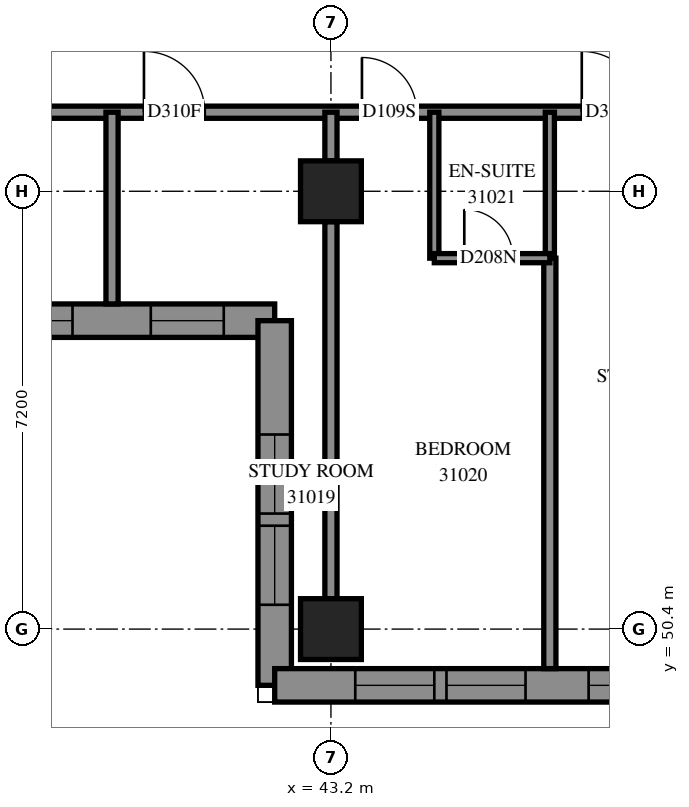
"""IFC4 building model, lengths in metres.
Left out: names, types, materials, properties, quantities, classifications, styles, units other than length and angle.
Written with IfcOpenShell. Run it as: python <this file> out.ifc"""

import sys

from ifc_helpers import new_model, si_unit, direction, frame, frame_2d, origin, origin_2d, place, context, subcontext, project, spatial, polyline, rectangle, outline, extrude, element, fill, save


model = new_model("IFC4")
c1 = context("Model", 3, precision=1e-05, world=origin(), true_north=direction((0.0, 1.0)))
c2 = subcontext(c1, "Body", "Model", "MODEL_VIEW")
j1 = project(units=[si_unit("LENGTHUNIT", "METRE"), si_unit("PLANEANGLEUNIT", "RADIAN")], contexts=[c1])
p1 = place(None, origin())
s1 = spatial("IfcSite", under=j1, at=p1, CompositionType="ELEMENT")
p2 = place(p1, origin())
s2 = spatial("IfcBuilding", under=s1, at=p2, CompositionType="ELEMENT")
p3 = place(p2, frame((0.0, 0.0, 115.2)))
s3 = spatial("IfcBuildingStorey", under=s2, at=p3, CompositionType="ELEMENT", Elevation=115.2)
for number, where, z_axis, x_axis in (
    (1, (43.2, 50.4, 0.0), (0.0, 0.0, 1.0), (1.0, 0.0, 0.0)),
    (2, (43.2, 57.6, 0.0), (0.0, 0.0, 1.0), (1.0, 0.0, 0.0)),
):
    element("IfcColumn", number, at=place(p3, frame(where, z_axis=z_axis, x_axis=x_axis)), inside=s3, PredefinedType="COLUMN", context=c2, shape_type="SweptSolid", body=[
        extrude(rectangle(XDim=1.0, YDim=1.0, at=origin_2d()), origin(), (0.0, 0.0, 1.0), 3.1),
    ])
p4 = place(p3, frame((27.875, 55.472, 0.0), z_axis=(0.0, 0.0, 1.0), x_axis=(1.0, 0.0, 0.0)))
e3 = element("IfcWall", 3, at=p4, inside=s3, PredefinedType="SOLIDWALL", context=c2, shape_type="SweptSolid", body=[
    extrude(outline(polyline([(-0.275, -0.275), (14.125, -0.275), (14.675, 0.275), (0.275, 0.275), (-0.275, -0.275)])), origin(), (0.0, 0.0, 1.0), 3.1),
])
p5 = place(p4, frame((1.175, 0.0, 0.5)))
e4 = element("IfcOpeningElement", 4, at=p5, cuts=e3, PredefinedType="OPENING", context=c2, shape_type="SweptSolid", body=[
    extrude(rectangle(XDim=1.3, YDim=2.45, at=frame_2d((0.65, 1.225))), frame((0.0, 0.285, 0.0), z_axis=(0.0, -1.0, 0.0), x_axis=(1.0, 0.0, 0.0)), (0.0, 0.0, 1.0), 0.57),
])
p6 = place(p4, frame((2.675, 0.0, 0.5)))
e5 = element("IfcOpeningElement", 5, at=p6, cuts=e3, PredefinedType="OPENING", context=c2, shape_type="SweptSolid", body=[
    extrude(rectangle(XDim=1.3, YDim=2.45, at=frame_2d((0.65, 1.225))), frame((0.0, 0.285, 0.0), z_axis=(0.0, -1.0, 0.0), x_axis=(1.0, 0.0, 0.0)), (0.0, 0.0, 1.0), 0.57),
])
p7 = place(p4, frame((4.925, 0.0, 0.5)))
e6 = element("IfcOpeningElement", 6, at=p7, cuts=e3, PredefinedType="OPENING", context=c2, shape_type="SweptSolid", body=[
    extrude(rectangle(XDim=1.3, YDim=2.45, at=frame_2d((0.65, 1.225))), frame((0.0, 0.285, 0.0), z_axis=(0.0, -1.0, 0.0), x_axis=(1.0, 0.0, 0.0)), (0.0, 0.0, 1.0), 0.57),
])
p8 = place(p4, frame((6.425, 0.0, 0.5)))
e7 = element("IfcOpeningElement", 7, at=p8, cuts=e3, PredefinedType="OPENING", context=c2, shape_type="SweptSolid", body=[
    extrude(rectangle(XDim=1.3, YDim=2.45, at=frame_2d((0.65, 1.225))), frame((0.0, 0.285, 0.0), z_axis=(0.0, -1.0, 0.0), x_axis=(1.0, 0.0, 0.0)), (0.0, 0.0, 1.0), 0.57),
])
p9 = place(p4, frame((8.275, 0.0, 0.5)))
e8 = element("IfcOpeningElement", 8, at=p9, cuts=e3, PredefinedType="OPENING", context=c2, shape_type="SweptSolid", body=[
    extrude(rectangle(XDim=1.3, YDim=2.45, at=frame_2d((0.65, 1.225))), frame((0.0, 0.285, 0.0), z_axis=(0.0, -1.0, 0.0), x_axis=(1.0, 0.0, 0.0)), (0.0, 0.0, 1.0), 0.57),
])
p10 = place(p4, frame((9.775, 0.0, 0.5)))
e9 = element("IfcOpeningElement", 9, at=p10, cuts=e3, PredefinedType="OPENING", context=c2, shape_type="SweptSolid", body=[
    extrude(rectangle(XDim=1.3, YDim=2.45, at=frame_2d((0.65, 1.225))), frame((0.0, 0.285, 0.0), z_axis=(0.0, -1.0, 0.0), x_axis=(1.0, 0.0, 0.0)), (0.0, 0.0, 1.0), 0.57),
])
p11 = place(p4, frame((12.363, 0.0, 0.5)))
e10 = element("IfcOpeningElement", 10, at=p11, cuts=e3, PredefinedType="OPENING", context=c2, shape_type="SweptSolid", body=[
    extrude(rectangle(XDim=1.2, YDim=2.45, at=frame_2d((0.6, 1.225))), frame((0.0, 0.285, 0.0), z_axis=(0.0, -1.0, 0.0), x_axis=(1.0, 0.0, 0.0)), (0.0, 0.0, 1.0), 0.57),
])
p12 = place(p3, frame((42.275, 55.472, 0.0), z_axis=(0.0, 0.0, 1.0), x_axis=(0.0, -1.0, 0.0)))
e11 = element("IfcWall", 11, at=p12, inside=s3, PredefinedType="SOLIDWALL", context=c2, shape_type="SweptSolid", body=[
    extrude(outline(polyline([(0.275, -0.275), (6.272, -0.275), (5.722, 0.275), (-0.275, 0.275), (0.275, -0.275)])), origin(), (0.0, 0.0, 1.0), 3.1),
])
p13 = place(p12, frame((1.872, 0.0, 0.5)))
e12 = element("IfcOpeningElement", 12, at=p13, cuts=e11, PredefinedType="OPENING", context=c2, shape_type="SweptSolid", body=[
    extrude(rectangle(XDim=1.3, YDim=2.45, at=frame_2d((0.65, 1.225))), frame((0.0, 0.285, 0.0), z_axis=(0.0, -1.0, 0.0), x_axis=(1.0, 0.0, 0.0)), (0.0, 0.0, 1.0), 0.57),
])
p14 = place(p12, frame((3.372, 0.0, 0.5)))
e13 = element("IfcOpeningElement", 13, at=p14, cuts=e11, PredefinedType="OPENING", context=c2, shape_type="SweptSolid", body=[
    extrude(rectangle(XDim=1.3, YDim=2.45, at=frame_2d((0.65, 1.225))), frame((0.0, 0.285, 0.0), z_axis=(0.0, -1.0, 0.0), x_axis=(1.0, 0.0, 0.0)), (0.0, 0.0, 1.0), 0.57),
])
p15 = place(p3, frame((42.275, 49.475, 0.0), z_axis=(0.0, 0.0, 1.0), x_axis=(1.0, 0.0, 0.0)))
e14 = element("IfcWall", 14, at=p15, inside=s3, PredefinedType="SOLIDWALL", context=c2, shape_type="SweptSolid", body=[
    extrude(outline(polyline([(-0.275, -0.275), (6.925, -0.275), (7.475, 0.275), (0.275, 0.275), (-0.275, -0.275)])), origin(), (0.0, 0.0, 1.0), 3.1),
])
p16 = place(p15, frame((1.325, 0.0, 0.5)))
e15 = element("IfcOpeningElement", 15, at=p16, cuts=e14, PredefinedType="OPENING", context=c2, shape_type="SweptSolid", body=[
    extrude(rectangle(XDim=1.3, YDim=2.45, at=frame_2d((0.65, 1.225))), frame((0.0, 0.285, 0.0), z_axis=(0.0, -1.0, 0.0), x_axis=(1.0, 0.0, 0.0)), (0.0, 0.0, 1.0), 0.57),
])
p17 = place(p15, frame((2.825, 0.0, 0.5)))
e16 = element("IfcOpeningElement", 16, at=p17, cuts=e14, PredefinedType="OPENING", context=c2, shape_type="SweptSolid", body=[
    extrude(rectangle(XDim=1.3, YDim=2.45, at=frame_2d((0.65, 1.225))), frame((0.0, 0.285, 0.0), z_axis=(0.0, -1.0, 0.0), x_axis=(1.0, 0.0, 0.0)), (0.0, 0.0, 1.0), 0.57),
])
p18 = place(p15, frame((5.162, 0.0, 0.5)))
e17 = element("IfcOpeningElement", 17, at=p18, cuts=e14, PredefinedType="OPENING", context=c2, shape_type="SweptSolid", body=[
    extrude(rectangle(XDim=1.2, YDim=2.45, at=frame_2d((0.6, 1.225))), frame((0.0, 0.285, 0.0), z_axis=(0.0, -1.0, 0.0), x_axis=(1.0, 0.0, 0.0)), (0.0, 0.0, 1.0), 0.57),
])
p19 = place(p3, frame((28.802, 58.9, 0.0), z_axis=(0.0, 0.0, 1.0), x_axis=(1.0, 0.0, 0.0)))
e18 = element("IfcWall", 18, at=p19, inside=s3, PredefinedType="PARTITIONING", context=c2, shape_type="SweptSolid", body=[
    extrude(rectangle(XDim=24.098, YDim=0.2, at=frame_2d((12.049, 0.0))), origin(), (0.0, 0.0, 1.0), 3.1),
])
p20 = place(p19, frame((11.323, 0.0, 0.0)))
e19 = element("IfcOpeningElement", 19, at=p20, cuts=e18, PredefinedType="OPENING", context=c2, shape_type="SweptSolid", body=[
    extrude(rectangle(XDim=1.0, YDim=2.1, at=frame_2d((0.5, 1.05))), frame((0.0, 0.11, 0.0), z_axis=(0.0, -1.0, 0.0), x_axis=(1.0, 0.0, 0.0)), (0.0, 0.0, 1.0), 0.22),
])
p21 = place(p19, frame((14.908, 0.0, 0.0)))
e20 = element("IfcOpeningElement", 20, at=p21, cuts=e18, PredefinedType="OPENING", context=c2, shape_type="SweptSolid", body=[
    extrude(rectangle(XDim=0.9, YDim=2.1, at=frame_2d((0.45, 1.05))), frame((0.0, 0.11, 0.0), z_axis=(0.0, -1.0, 0.0), x_axis=(1.0, 0.0, 0.0)), (0.0, 0.0, 1.0), 0.22),
])
p22 = place(p19, frame((18.523, 0.0, 0.0)))
e21 = element("IfcOpeningElement", 21, at=p22, cuts=e18, PredefinedType="OPENING", context=c2, shape_type="SweptSolid", body=[
    extrude(rectangle(XDim=1.0, YDim=2.1, at=frame_2d((0.5, 1.05))), frame((0.0, 0.11, 0.0), z_axis=(0.0, -1.0, 0.0), x_axis=(1.0, 0.0, 0.0)), (0.0, 0.0, 1.0), 0.22),
])
p23 = place(p19, frame((22.845, 0.0, 0.0)))
e22 = element("IfcOpeningElement", 22, at=p23, cuts=e18, PredefinedType="OPENING", context=c2, shape_type="SweptSolid", body=[
    extrude(rectangle(XDim=1.0, YDim=2.1, at=frame_2d((0.5, 1.05))), frame((0.0, 0.11, 0.0), z_axis=(0.0, -1.0, 0.0), x_axis=(1.0, 0.0, 0.0)), (0.0, 0.0, 1.0), 0.22),
])
p24 = place(p3, frame((46.8, 49.75, 0.0), z_axis=(0.0, 0.0, 1.0), x_axis=(0.0, 1.0, 0.0)))
e23 = element("IfcWall", 23, at=p24, inside=s3, PredefinedType="PARTITIONING", context=c2, shape_type="SweptSolid", body=[
    extrude(rectangle(XDim=6.75, YDim=0.2, at=frame_2d((3.375, 0.0))), origin(), (0.0, 0.0, 1.0), 3.1),
])
p25 = place(p3, frame((43.2, 50.9, 0.0), z_axis=(0.0, 0.0, 1.0), x_axis=(0.0, 1.0, 0.0)))
e24 = element("IfcWall", 24, at=p25, inside=s3, PredefinedType="PARTITIONING", context=c2, shape_type="SweptSolid", body=[
    extrude(rectangle(XDim=6.2, YDim=0.2, at=frame_2d((3.1, 0.0))), origin(), (0.0, 0.0, 1.0), 2.6),
])
p26 = place(p3, frame((39.6, 55.747, 0.0), z_axis=(0.0, 0.0, 1.0), x_axis=(0.0, 1.0, 0.0)))
e25 = element("IfcWall", 25, at=p26, inside=s3, PredefinedType="PARTITIONING", context=c2, shape_type="SweptSolid", body=[
    extrude(rectangle(XDim=3.153, YDim=0.2, at=frame_2d((1.577, 0.0))), origin(), (0.0, 0.0, 1.0), 3.1),
])
for number, where, z_axis, x_axis in (
    (26, (44.9, 56.5, 0.0), (0.0, 0.0, 1.0), (0.0, 1.0, 0.0)),
    (27, (46.8, 56.5, 0.0), (0.0, 0.0, 1.0), (0.0, 1.0, 0.0)),
):
    element("IfcWall", number, at=place(p3, frame(where, z_axis=z_axis, x_axis=x_axis)), inside=s3, PredefinedType="PARTITIONING", context=c2, shape_type="SweptSolid", body=[
        extrude(rectangle(XDim=2.4, YDim=0.15, at=frame_2d((1.2, 0.0))), origin(), (0.0, 0.0, 1.0), 3.1),
    ])
p27 = place(p3, frame((44.9, 56.5, 0.0), z_axis=(0.0, 0.0, 1.0), x_axis=(1.0, 0.0, 0.0)))
e28 = element("IfcWall", 28, at=p27, inside=s3, PredefinedType="PARTITIONING", context=c2, shape_type="SweptSolid", body=[
    extrude(rectangle(XDim=1.9, YDim=0.15, at=frame_2d((0.95, 0.0))), origin(), (0.0, 0.0, 1.0), 3.1),
])
p28 = place(p27, frame((0.493, 0.0, 0.0)))
e29 = element("IfcOpeningElement", 29, at=p28, cuts=e28, PredefinedType="OPENING", context=c2, shape_type="SweptSolid", body=[
    extrude(rectangle(XDim=0.8, YDim=2.1, at=frame_2d((0.4, 1.05))), frame((0.0, 0.085, 0.0), z_axis=(0.0, -1.0, 0.0), x_axis=(1.0, 0.0, 0.0)), (0.0, 0.0, 1.0), 0.17),
])
p29 = place(p3, frame((43.2, 58.1, 0.0), z_axis=(0.0, 0.0, 1.0), x_axis=(0.0, 1.0, 0.0)))
e30 = element("IfcWall", 30, at=p29, inside=s3, PredefinedType="PARTITIONING", context=c2, shape_type="SweptSolid", body=[
    extrude(rectangle(XDim=0.8, YDim=0.2, at=frame_2d((0.4, 0.0))), origin(), (0.0, 0.0, 1.0), 3.1),
])
p30 = place(p10, origin())
e31 = element("IfcWindow", 31, at=p30, inside=s3, PartitioningType="SINGLE_PANEL", PredefinedType="WINDOW", context=c2, shape_type="SweptSolid", body=[
    extrude(rectangle(XDim=1.3, YDim=2.45, at=frame_2d((0.65, 1.225))), frame((0.0, 0.155, 0.0), z_axis=(0.0, -1.0, 0.0), x_axis=(1.0, 0.0, 0.0)), (0.0, 0.0, 1.0), 0.06),
])
fill(e9, e31)
p31 = place(p11, origin())
e32 = element("IfcWindow", 32, at=p31, inside=s3, PartitioningType="SINGLE_PANEL", PredefinedType="WINDOW", context=c2, shape_type="SweptSolid", body=[
    extrude(rectangle(XDim=1.2, YDim=2.45, at=frame_2d((0.6, 1.225))), frame((0.0, 0.155, 0.0), z_axis=(0.0, -1.0, 0.0), x_axis=(1.0, 0.0, 0.0)), (0.0, 0.0, 1.0), 0.06),
])
fill(e10, e32)
p32 = place(p13, origin())
e33 = element("IfcWindow", 33, at=p32, inside=s3, PartitioningType="SINGLE_PANEL", PredefinedType="WINDOW", context=c2, shape_type="SweptSolid", body=[
    extrude(rectangle(XDim=1.3, YDim=2.45, at=frame_2d((0.65, 1.225))), frame((0.0, 0.155, 0.0), z_axis=(0.0, -1.0, 0.0), x_axis=(1.0, 0.0, 0.0)), (0.0, 0.0, 1.0), 0.06),
])
fill(e12, e33)
p33 = place(p14, origin())
e34 = element("IfcWindow", 34, at=p33, inside=s3, PartitioningType="SINGLE_PANEL", PredefinedType="WINDOW", context=c2, shape_type="SweptSolid", body=[
    extrude(rectangle(XDim=1.3, YDim=2.45, at=frame_2d((0.65, 1.225))), frame((0.0, 0.155, 0.0), z_axis=(0.0, -1.0, 0.0), x_axis=(1.0, 0.0, 0.0)), (0.0, 0.0, 1.0), 0.06),
])
fill(e13, e34)
p34 = place(p16, origin())
e35 = element("IfcWindow", 35, at=p34, inside=s3, PartitioningType="SINGLE_PANEL", PredefinedType="WINDOW", context=c2, shape_type="SweptSolid", body=[
    extrude(rectangle(XDim=1.3, YDim=2.45, at=frame_2d((0.65, 1.225))), frame((0.0, 0.155, 0.0), z_axis=(0.0, -1.0, 0.0), x_axis=(1.0, 0.0, 0.0)), (0.0, 0.0, 1.0), 0.06),
])
fill(e15, e35)
p35 = place(p17, origin())
e36 = element("IfcWindow", 36, at=p35, inside=s3, PartitioningType="SINGLE_PANEL", PredefinedType="WINDOW", context=c2, shape_type="SweptSolid", body=[
    extrude(rectangle(XDim=1.3, YDim=2.45, at=frame_2d((0.65, 1.225))), frame((0.0, 0.155, 0.0), z_axis=(0.0, -1.0, 0.0), x_axis=(1.0, 0.0, 0.0)), (0.0, 0.0, 1.0), 0.06),
])
fill(e16, e36)
p36 = place(p18, origin())
e37 = element("IfcWindow", 37, at=p36, inside=s3, PartitioningType="SINGLE_PANEL", PredefinedType="WINDOW", context=c2, shape_type="SweptSolid", body=[
    extrude(rectangle(XDim=1.2, YDim=2.45, at=frame_2d((0.6, 1.225))), frame((0.0, 0.155, 0.0), z_axis=(0.0, -1.0, 0.0), x_axis=(1.0, 0.0, 0.0)), (0.0, 0.0, 1.0), 0.06),
])
fill(e17, e37)
p37 = place(p20, origin())
e38 = element("IfcDoor", 38, at=p37, inside=s3, OperationType="SINGLE_SWING_RIGHT", PredefinedType="DOOR", context=c2, shape_type="SweptSolid", body=[
    extrude(rectangle(XDim=1.0, YDim=2.1, at=frame_2d((0.5, 1.05))), frame((0.0, 0.025, 0.0), z_axis=(0.0, -1.0, 0.0), x_axis=(1.0, 0.0, 0.0)), (0.0, 0.0, 1.0), 0.05),
])
fill(e19, e38)
p38 = place(p21, origin())
e39 = element("IfcDoor", 39, at=p38, inside=s3, OperationType="SINGLE_SWING_LEFT", PredefinedType="DOOR", context=c2, shape_type="SweptSolid", body=[
    extrude(rectangle(XDim=0.9, YDim=2.1, at=frame_2d((0.45, 1.05))), frame((0.0, 0.025, 0.0), z_axis=(0.0, -1.0, 0.0), x_axis=(1.0, 0.0, 0.0)), (0.0, 0.0, 1.0), 0.05),
])
fill(e20, e39)
p39 = place(p28, origin())
e40 = element("IfcDoor", 40, at=p39, inside=s3, OperationType="SINGLE_SWING_RIGHT", PredefinedType="DOOR", context=c2, shape_type="SweptSolid", body=[
    extrude(rectangle(XDim=0.8, YDim=2.1, at=frame_2d((0.4, 1.05))), frame((0.0, 0.025, 0.0), z_axis=(0.0, -1.0, 0.0), x_axis=(1.0, 0.0, 0.0)), (0.0, 0.0, 1.0), 0.05),
])
fill(e29, e40)
p40 = place(p22, origin())
e41 = element("IfcDoor", 41, at=p40, inside=s3, OperationType="SINGLE_SWING_RIGHT", PredefinedType="DOOR", context=c2, shape_type="SweptSolid", body=[
    extrude(rectangle(XDim=1.0, YDim=2.1, at=frame_2d((0.5, 1.05))), frame((0.0, 0.025, 0.0), z_axis=(0.0, -1.0, 0.0), x_axis=(1.0, 0.0, 0.0)), (0.0, 0.0, 1.0), 0.05),
])
fill(e21, e41)
save(model, sys.argv[1])
